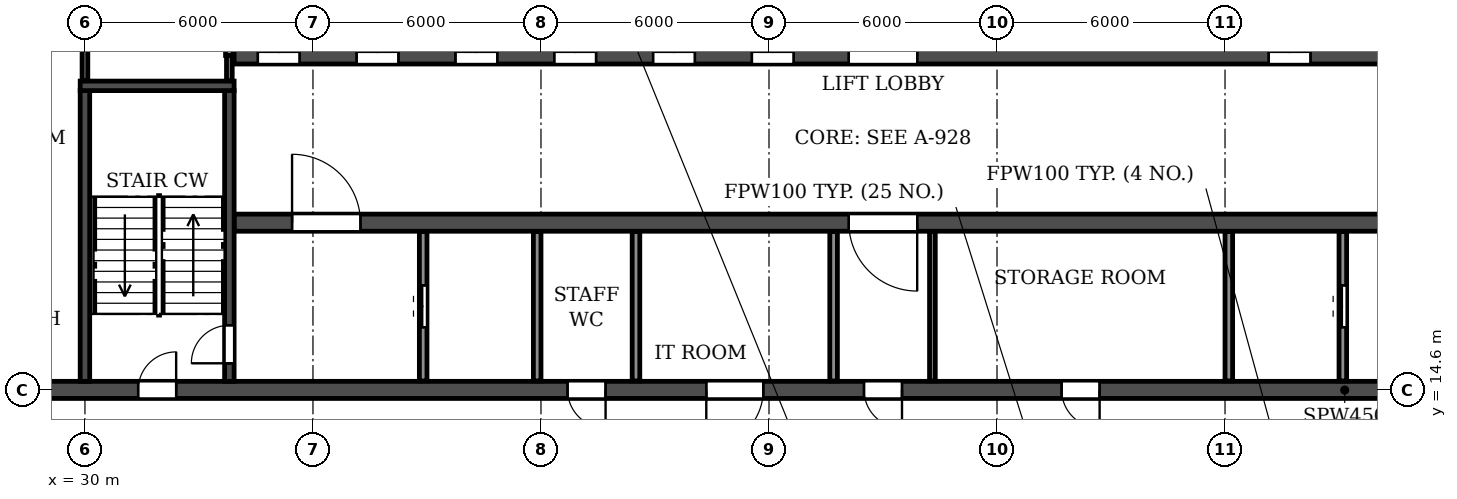
"""IFC4 building model, lengths in metres.
Left out: names, types, materials, properties, quantities, classifications, styles, units other than length and angle.
Written with IfcOpenShell. Run it as: python <this file> out.ifc"""

import sys

from ifc_helpers import new_model, si_unit, direction, frame, frame_2d, origin, place, context, subcontext, project, spatial, rectangle, extrude, element, fill, save


model = new_model("IFC4")
c1 = context("Model", 3, precision=1e-05, world=origin(), true_north=direction((0.0, 1.0)))
c2 = subcontext(c1, "Body", "Model", "MODEL_VIEW")
j1 = project(units=[si_unit("LENGTHUNIT", "METRE"), si_unit("PLANEANGLEUNIT", "RADIAN")], contexts=[c1])
p1 = place(None, origin())
s1 = spatial("IfcSite", under=j1, at=p1, CompositionType="ELEMENT")
p2 = place(p1, origin())
s2 = spatial("IfcBuilding", under=s1, at=p2, CompositionType="ELEMENT")
p3 = place(p2, frame((0.0, 0.0, 155.4)))
s3 = spatial("IfcBuildingStorey", under=s2, at=p3, CompositionType="ELEMENT", Elevation=155.4)
p4 = place(p3, frame((12.2, 14.6, 0.0), z_axis=(0.0, 0.0, 1.0), x_axis=(1.0, 0.0, 0.0)))
e1 = element("IfcWall", 1, at=p4, inside=s3, PredefinedType="SOLIDWALL", context=c2, shape_type="SweptSolid", body=[
    extrude(rectangle(XDim=77.6, YDim=0.45, at=frame_2d((38.8, 0.0))), origin(), (0.0, 0.0, 1.0), 3.0),
])
p5 = place(p4, frame((2.3, 0.0, 0.0)))
e2 = element("IfcOpeningElement", 2, at=p5, cuts=e1, PredefinedType="OPENING", context=c2, shape_type="SweptSolid", body=[
    extrude(rectangle(XDim=1.0, YDim=2.1, at=frame_2d((0.5, 1.05))), frame((0.0, 0.235, 0.0), z_axis=(0.0, -1.0, 0.0), x_axis=(1.0, 0.0, 0.0)), (0.0, 0.0, 1.0), 0.47),
])
p6 = place(p4, frame((6.7, 0.0, 0.0)))
e3 = element("IfcOpeningElement", 3, at=p6, cuts=e1, PredefinedType="OPENING", context=c2, shape_type="SweptSolid", body=[
    extrude(rectangle(XDim=1.0, YDim=2.1, at=frame_2d((0.5, 1.05))), frame((0.0, 0.235, 0.0), z_axis=(0.0, -1.0, 0.0), x_axis=(1.0, 0.0, 0.0)), (0.0, 0.0, 1.0), 0.47),
])
p7 = place(p4, frame((14.6, 0.0, 0.0)))
e4 = element("IfcOpeningElement", 4, at=p7, cuts=e1, PredefinedType="OPENING", context=c2, shape_type="SweptSolid", body=[
    extrude(rectangle(XDim=1.0, YDim=2.1, at=frame_2d((0.5, 1.05))), frame((0.0, 0.235, 0.0), z_axis=(0.0, -1.0, 0.0), x_axis=(1.0, 0.0, 0.0)), (0.0, 0.0, 1.0), 0.47),
])
p8 = place(p4, frame((19.2, 0.0, 0.0)))
e5 = element("IfcOpeningElement", 5, at=p8, cuts=e1, PredefinedType="OPENING", context=c2, shape_type="SweptSolid", body=[
    extrude(rectangle(XDim=1.0, YDim=2.1, at=frame_2d((0.5, 1.05))), frame((0.0, 0.235, 0.0), z_axis=(0.0, -1.0, 0.0), x_axis=(1.0, 0.0, 0.0)), (0.0, 0.0, 1.0), 0.47),
])
p9 = place(p4, frame((30.5, 0.0, 0.0)))
e6 = element("IfcOpeningElement", 6, at=p9, cuts=e1, PredefinedType="OPENING", context=c2, shape_type="SweptSolid", body=[
    extrude(rectangle(XDim=1.0, YDim=2.1, at=frame_2d((0.5, 1.05))), frame((0.0, 0.235, 0.0), z_axis=(0.0, -1.0, 0.0), x_axis=(1.0, 0.0, 0.0)), (0.0, 0.0, 1.0), 0.47),
])
p10 = place(p4, frame((34.15, 0.0, 0.0)))
e7 = element("IfcOpeningElement", 7, at=p10, cuts=e1, PredefinedType="OPENING", context=c2, shape_type="SweptSolid", body=[
    extrude(rectangle(XDim=1.5, YDim=2.1, at=frame_2d((0.75, 1.05))), frame((0.0, 0.235, 0.0), z_axis=(0.0, -1.0, 0.0), x_axis=(1.0, 0.0, 0.0)), (0.0, 0.0, 1.0), 0.47),
])
p11 = place(p4, frame((38.3, 0.0, 0.0)))
e8 = element("IfcOpeningElement", 8, at=p11, cuts=e1, PredefinedType="OPENING", context=c2, shape_type="SweptSolid", body=[
    extrude(rectangle(XDim=1.0, YDim=2.1, at=frame_2d((0.5, 1.05))), frame((0.0, 0.235, 0.0), z_axis=(0.0, -1.0, 0.0), x_axis=(1.0, 0.0, 0.0)), (0.0, 0.0, 1.0), 0.47),
])
p12 = place(p4, frame((43.5, 0.0, 0.0)))
e9 = element("IfcOpeningElement", 9, at=p12, cuts=e1, PredefinedType="OPENING", context=c2, shape_type="SweptSolid", body=[
    extrude(rectangle(XDim=1.0, YDim=2.1, at=frame_2d((0.5, 1.05))), frame((0.0, 0.235, 0.0), z_axis=(0.0, -1.0, 0.0), x_axis=(1.0, 0.0, 0.0)), (0.0, 0.0, 1.0), 0.47),
])
p13 = place(p4, frame((57.4, 0.0, 0.0)))
e10 = element("IfcOpeningElement", 10, at=p13, cuts=e1, PredefinedType="OPENING", context=c2, shape_type="SweptSolid", body=[
    extrude(rectangle(XDim=1.0, YDim=2.1, at=frame_2d((0.5, 1.05))), frame((0.0, 0.235, 0.0), z_axis=(0.0, -1.0, 0.0), x_axis=(1.0, 0.0, 0.0)), (0.0, 0.0, 1.0), 0.47),
])
p14 = place(p4, frame((62.0, 0.0, 0.0)))
e11 = element("IfcOpeningElement", 11, at=p14, cuts=e1, PredefinedType="OPENING", context=c2, shape_type="SweptSolid", body=[
    extrude(rectangle(XDim=1.0, YDim=2.1, at=frame_2d((0.5, 1.05))), frame((0.0, 0.235, 0.0), z_axis=(0.0, -1.0, 0.0), x_axis=(1.0, 0.0, 0.0)), (0.0, 0.0, 1.0), 0.47),
])
p15 = place(p4, frame((69.9, 0.0, 0.0)))
e12 = element("IfcOpeningElement", 12, at=p15, cuts=e1, PredefinedType="OPENING", context=c2, shape_type="SweptSolid", body=[
    extrude(rectangle(XDim=1.0, YDim=2.1, at=frame_2d((0.5, 1.05))), frame((0.0, 0.235, 0.0), z_axis=(0.0, -1.0, 0.0), x_axis=(1.0, 0.0, 0.0)), (0.0, 0.0, 1.0), 0.47),
])
p16 = place(p4, frame((74.3, 0.0, 0.0)))
e13 = element("IfcOpeningElement", 13, at=p16, cuts=e1, PredefinedType="OPENING", context=c2, shape_type="SweptSolid", body=[
    extrude(rectangle(XDim=1.0, YDim=2.1, at=frame_2d((0.5, 1.05))), frame((0.0, 0.235, 0.0), z_axis=(0.0, -1.0, 0.0), x_axis=(1.0, 0.0, 0.0)), (0.0, 0.0, 1.0), 0.47),
])
p17 = place(p3, frame((33.925, 19.0, 0.0), z_axis=(0.0, 0.0, 1.0), x_axis=(1.0, 0.0, 0.0)))
e14 = element("IfcWall", 14, at=p17, inside=s3, PredefinedType="SOLIDWALL", context=c2, shape_type="SweptSolid", body=[
    extrude(rectangle(XDim=34.15, YDim=0.45, at=frame_2d((17.075, 0.0))), origin(), (0.0, 0.0, 1.0), 3.0),
])
p18 = place(p17, frame((16.175, 0.0, 0.0)))
e15 = element("IfcOpeningElement", 15, at=p18, cuts=e14, PredefinedType="OPENING", context=c2, shape_type="SweptSolid", body=[
    extrude(rectangle(XDim=1.8, YDim=2.1, at=frame_2d((0.9, 1.05))), frame((0.0, 0.235, 0.0), z_axis=(0.0, -1.0, 0.0), x_axis=(1.0, 0.0, 0.0)), (0.0, 0.0, 1.0), 0.47),
])
p19 = place(p17, frame((1.525, 0.0, 0.0)))
e16 = element("IfcOpeningElement", 16, at=p19, cuts=e14, PredefinedType="OPENING", context=c2, shape_type="SweptSolid", body=[
    extrude(rectangle(XDim=1.8, YDim=2.1, at=frame_2d((0.9, 1.05))), frame((0.0, 0.235, 0.0), z_axis=(0.0, -1.0, 0.0), x_axis=(1.0, 0.0, 0.0)), (0.0, 0.0, 1.0), 0.47),
])
p20 = place(p17, frame((30.825, 0.0, 0.0)))
e17 = element("IfcOpeningElement", 17, at=p20, cuts=e14, PredefinedType="OPENING", context=c2, shape_type="SweptSolid", body=[
    extrude(rectangle(XDim=1.8, YDim=2.1, at=frame_2d((0.9, 1.05))), frame((0.0, 0.235, 0.0), z_axis=(0.0, -1.0, 0.0), x_axis=(1.0, 0.0, 0.0)), (0.0, 0.0, 1.0), 0.47),
])
p21 = place(p3, frame((33.925, 23.4, 0.0), z_axis=(0.0, 0.0, 1.0), x_axis=(1.0, 0.0, 0.0)))
e18 = element("IfcWall", 18, at=p21, inside=s3, PredefinedType="SOLIDWALL", context=c2, shape_type="SweptSolid", body=[
    extrude(rectangle(XDim=34.15, YDim=0.45, at=frame_2d((17.075, 0.0))), origin(), (0.0, 0.0, 1.0), 3.0),
])
p22 = place(p21, frame((16.175, 0.0, 0.0)))
e19 = element("IfcOpeningElement", 19, at=p22, cuts=e18, PredefinedType="OPENING", context=c2, shape_type="SweptSolid", body=[
    extrude(rectangle(XDim=1.8, YDim=2.1, at=frame_2d((0.9, 1.05))), frame((0.0, 0.235, 0.0), z_axis=(0.0, -1.0, 0.0), x_axis=(1.0, 0.0, 0.0)), (0.0, 0.0, 1.0), 0.47),
])
p23 = place(p21, frame((0.625, 0.0, 0.0)))
e20 = element("IfcOpeningElement", 20, at=p23, cuts=e18, PredefinedType="OPENING", context=c2, shape_type="SweptSolid", body=[
    extrude(rectangle(XDim=1.1, YDim=2.1, at=frame_2d((0.55, 1.05))), frame((0.0, 0.235, 0.0), z_axis=(0.0, -1.0, 0.0), x_axis=(1.0, 0.0, 0.0)), (0.0, 0.0, 1.0), 0.47),
])
p24 = place(p21, frame((3.225, 0.0, 0.0)))
e21 = element("IfcOpeningElement", 21, at=p24, cuts=e18, PredefinedType="OPENING", context=c2, shape_type="SweptSolid", body=[
    extrude(rectangle(XDim=1.1, YDim=2.1, at=frame_2d((0.55, 1.05))), frame((0.0, 0.235, 0.0), z_axis=(0.0, -1.0, 0.0), x_axis=(1.0, 0.0, 0.0)), (0.0, 0.0, 1.0), 0.47),
])
p25 = place(p21, frame((5.825, 0.0, 0.0)))
e22 = element("IfcOpeningElement", 22, at=p25, cuts=e18, PredefinedType="OPENING", context=c2, shape_type="SweptSolid", body=[
    extrude(rectangle(XDim=1.1, YDim=2.1, at=frame_2d((0.55, 1.05))), frame((0.0, 0.235, 0.0), z_axis=(0.0, -1.0, 0.0), x_axis=(1.0, 0.0, 0.0)), (0.0, 0.0, 1.0), 0.47),
])
p26 = place(p21, frame((8.425, 0.0, 0.0)))
e23 = element("IfcOpeningElement", 23, at=p26, cuts=e18, PredefinedType="OPENING", context=c2, shape_type="SweptSolid", body=[
    extrude(rectangle(XDim=1.1, YDim=2.1, at=frame_2d((0.55, 1.05))), frame((0.0, 0.235, 0.0), z_axis=(0.0, -1.0, 0.0), x_axis=(1.0, 0.0, 0.0)), (0.0, 0.0, 1.0), 0.47),
])
p27 = place(p21, frame((11.025, 0.0, 0.0)))
e24 = element("IfcOpeningElement", 24, at=p27, cuts=e18, PredefinedType="OPENING", context=c2, shape_type="SweptSolid", body=[
    extrude(rectangle(XDim=1.1, YDim=2.1, at=frame_2d((0.55, 1.05))), frame((0.0, 0.235, 0.0), z_axis=(0.0, -1.0, 0.0), x_axis=(1.0, 0.0, 0.0)), (0.0, 0.0, 1.0), 0.47),
])
p28 = place(p21, frame((13.625, 0.0, 0.0)))
e25 = element("IfcOpeningElement", 25, at=p28, cuts=e18, PredefinedType="OPENING", context=c2, shape_type="SweptSolid", body=[
    extrude(rectangle(XDim=1.1, YDim=2.1, at=frame_2d((0.55, 1.05))), frame((0.0, 0.235, 0.0), z_axis=(0.0, -1.0, 0.0), x_axis=(1.0, 0.0, 0.0)), (0.0, 0.0, 1.0), 0.47),
])
p29 = place(p21, frame((27.225, 0.0, 0.0)))
e26 = element("IfcOpeningElement", 26, at=p29, cuts=e18, PredefinedType="OPENING", context=c2, shape_type="SweptSolid", body=[
    extrude(rectangle(XDim=1.1, YDim=2.1, at=frame_2d((0.55, 1.05))), frame((0.0, 0.235, 0.0), z_axis=(0.0, -1.0, 0.0), x_axis=(1.0, 0.0, 0.0)), (0.0, 0.0, 1.0), 0.47),
])
p30 = place(p3, frame((30.0, 14.825, 0.0), z_axis=(0.0, 0.0, 1.0), x_axis=(0.0, 1.0, 0.0)))
e27 = element("IfcWall", 27, at=p30, inside=s3, PredefinedType="SOLIDWALL", context=c2, shape_type="SweptSolid", body=[
    extrude(rectangle(XDim=7.65, YDim=0.25, at=frame_2d((3.825, 0.0))), origin(), (0.0, 0.0, 1.0), 3.0),
])
p31 = place(p3, frame((33.8, 14.825, 0.0), z_axis=(0.0, 0.0, 1.0), x_axis=(0.0, 1.0, 0.0)))
e28 = element("IfcWall", 28, at=p31, inside=s3, PredefinedType="SOLIDWALL", context=c2, shape_type="SweptSolid", body=[
    extrude(rectangle(XDim=7.65, YDim=0.25, at=frame_2d((3.825, 0.0))), origin(), (0.0, 0.0, 1.0), 3.0),
])
p32 = place(p31, frame((0.475, 0.0, 0.0)))
e29 = element("IfcOpeningElement", 29, at=p32, cuts=e28, PredefinedType="OPENING", context=c2, shape_type="SweptSolid", body=[
    extrude(rectangle(XDim=1.0, YDim=2.1, at=frame_2d((0.5, 1.05))), frame((0.0, 0.135, 0.0), z_axis=(0.0, -1.0, 0.0), x_axis=(1.0, 0.0, 0.0)), (0.0, 0.0, 1.0), 0.27),
])
p33 = place(p3, frame((29.875, 22.6, 0.0), z_axis=(0.0, 0.0, 1.0), x_axis=(1.0, 0.0, 0.0)))
e30 = element("IfcWall", 30, at=p33, inside=s3, PredefinedType="SOLIDWALL", context=c2, shape_type="SweptSolid", body=[
    extrude(rectangle(XDim=4.05, YDim=0.25, at=frame_2d((2.025, 0.0))), origin(), (0.0, 0.0, 1.0), 3.0),
])
p34 = place(p3, frame((52.3, 14.835, 0.0), z_axis=(0.0, 0.0, 1.0), x_axis=(0.0, 1.0, 0.0)))
e31 = element("IfcWall", 31, at=p34, inside=s3, PredefinedType="PARTITIONING", context=c2, shape_type="SweptSolid", body=[
    extrude(rectangle(XDim=3.93, YDim=0.15, at=frame_2d((1.965, 0.0))), origin(), (0.0, 0.0, 1.0), 3.0),
])
for number, where, z_axis, x_axis in (
    (32, (44.5, 14.835, 0.0), (0.0, 0.0, 1.0), (0.0, 1.0, 0.0)),
    (33, (49.7, 14.835, 0.0), (0.0, 0.0, 1.0), (0.0, 1.0, 0.0)),
):
    element("IfcWall", number, at=place(p3, frame(where, z_axis=z_axis, x_axis=x_axis)), inside=s3, PredefinedType="PARTITIONING", context=c2, shape_type="SweptSolid", body=[
        extrude(rectangle(XDim=3.93, YDim=0.2, at=frame_2d((1.965, 0.0))), origin(), (0.0, 0.0, 1.0), 3.0),
    ])
p35 = place(p3, frame((30.0, 22.735, 0.0), z_axis=(0.0, 0.0, 1.0), x_axis=(0.0, 1.0, 0.0)))
e34 = element("IfcWall", 34, at=p35, inside=s3, PredefinedType="PARTITIONING", context=c2, shape_type="SweptSolid", body=[
    extrude(rectangle(XDim=4.83, YDim=0.15, at=frame_2d((2.415, 0.0))), origin(), (0.0, 0.0, 1.0), 3.0),
])
p36 = place(p3, frame((33.8, 22.735, 0.0), z_axis=(0.0, 0.0, 1.0), x_axis=(0.0, 1.0, 0.0)))
e35 = element("IfcWall", 35, at=p36, inside=s3, PredefinedType="PARTITIONING", context=c2, shape_type="SweptSolid", body=[
    extrude(rectangle(XDim=0.665, YDim=0.15, at=frame_2d((0.333, 0.0))), origin(), (0.0, 0.0, 1.0), 3.0),
])
p37 = place(p3, frame((33.8, 23.4, 0.0), z_axis=(0.0, 0.0, 1.0), x_axis=(0.0, 1.0, 0.0)))
e36 = element("IfcWall", 36, at=p37, inside=s3, PredefinedType="PARTITIONING", context=c2, shape_type="SweptSolid", body=[
    extrude(rectangle(XDim=2.7, YDim=0.2, at=frame_2d((1.35, 0.0))), origin(), (0.0, 0.0, 1.0), 3.0),
])
p38 = place(p3, frame((38.9, 14.835, 0.0), z_axis=(0.0, 0.0, 1.0), x_axis=(0.0, 1.0, 0.0)))
e37 = element("IfcWall", 37, at=p38, inside=s3, PredefinedType="PARTITIONING", context=c2, shape_type="SweptSolid", body=[
    extrude(rectangle(XDim=3.93, YDim=0.2, at=frame_2d((1.965, 0.0))), origin(), (0.0, 0.0, 1.0), 3.0),
])
p39 = place(p38, frame((1.415, 0.0, 0.0)))
e38 = element("IfcOpeningElement", 38, at=p39, cuts=e37, PredefinedType="OPENING", context=c2, shape_type="SweptSolid", body=[
    extrude(rectangle(XDim=1.1, YDim=2.1, at=frame_2d((0.55, 1.05))), frame((0.0, 0.11, 0.0), z_axis=(0.0, -1.0, 0.0), x_axis=(1.0, 0.0, 0.0)), (0.0, 0.0, 1.0), 0.22),
])
for number, where, z_axis, x_axis in (
    (39, (41.9, 14.835, 0.0), (0.0, 0.0, 1.0), (0.0, 1.0, 0.0)),
    (40, (60.1, 14.835, 0.0), (0.0, 0.0, 1.0), (0.0, 1.0, 0.0)),
):
    element("IfcWall", number, at=place(p3, frame(where, z_axis=z_axis, x_axis=x_axis)), inside=s3, PredefinedType="PARTITIONING", context=c2, shape_type="SweptSolid", body=[
        extrude(rectangle(XDim=3.93, YDim=0.2, at=frame_2d((1.965, 0.0))), origin(), (0.0, 0.0, 1.0), 3.0),
    ])
p40 = place(p3, frame((63.1, 14.835, 0.0), z_axis=(0.0, 0.0, 1.0), x_axis=(0.0, 1.0, 0.0)))
e41 = element("IfcWall", 41, at=p40, inside=s3, PredefinedType="PARTITIONING", context=c2, shape_type="SweptSolid", body=[
    extrude(rectangle(XDim=3.93, YDim=0.2, at=frame_2d((1.965, 0.0))), origin(), (0.0, 0.0, 1.0), 3.0),
])
p41 = place(p40, frame((1.415, 0.0, 0.0)))
e42 = element("IfcOpeningElement", 42, at=p41, cuts=e41, PredefinedType="OPENING", context=c2, shape_type="SweptSolid", body=[
    extrude(rectangle(XDim=1.1, YDim=2.1, at=frame_2d((0.55, 1.05))), frame((0.0, 0.11, 0.0), z_axis=(0.0, -1.0, 0.0), x_axis=(1.0, 0.0, 0.0)), (0.0, 0.0, 1.0), 0.22),
])
p42 = place(p8, origin())
e43 = element("IfcDoor", 43, at=p42, inside=s3, OperationType="SINGLE_SWING_RIGHT", PredefinedType="DOOR", context=c2, shape_type="SweptSolid", body=[
    extrude(rectangle(XDim=1.0, YDim=2.1, at=frame_2d((0.5, 1.05))), frame((0.0, 0.025, 0.0), z_axis=(0.0, -1.0, 0.0), x_axis=(1.0, 0.0, 0.0)), (0.0, 0.0, 1.0), 0.05),
])
fill(e5, e43)
p43 = place(p9, frame((1.0, 0.0, 0.0), z_axis=(0.0, 0.0, 1.0), x_axis=(-1.0, 0.0, 0.0)))
e44 = element("IfcDoor", 44, at=p43, inside=s3, OperationType="SINGLE_SWING_LEFT", PredefinedType="DOOR", context=c2, shape_type="SweptSolid", body=[
    extrude(rectangle(XDim=1.0, YDim=2.1, at=frame_2d((0.5, 1.05))), frame((0.0, 0.025, 0.0), z_axis=(0.0, -1.0, 0.0), x_axis=(1.0, 0.0, 0.0)), (0.0, 0.0, 1.0), 0.05),
])
fill(e6, e44)
p44 = place(p10, frame((1.5, 0.0, 0.0), z_axis=(0.0, 0.0, 1.0), x_axis=(-1.0, 0.0, 0.0)))
e45 = element("IfcDoor", 45, at=p44, inside=s3, OperationType="DOUBLE_DOOR_SINGLE_SWING", PredefinedType="DOOR", context=c2, shape_type="SweptSolid", body=[
    extrude(rectangle(XDim=1.5, YDim=2.1, at=frame_2d((0.75, 1.05))), frame((0.0, 0.025, 0.0), z_axis=(0.0, -1.0, 0.0), x_axis=(1.0, 0.0, 0.0)), (0.0, 0.0, 1.0), 0.05),
])
fill(e7, e45)
p45 = place(p11, frame((1.0, 0.0, 0.0), z_axis=(0.0, 0.0, 1.0), x_axis=(-1.0, 0.0, 0.0)))
e46 = element("IfcDoor", 46, at=p45, inside=s3, OperationType="SINGLE_SWING_LEFT", PredefinedType="DOOR", context=c2, shape_type="SweptSolid", body=[
    extrude(rectangle(XDim=1.0, YDim=2.1, at=frame_2d((0.5, 1.05))), frame((0.0, 0.025, 0.0), z_axis=(0.0, -1.0, 0.0), x_axis=(1.0, 0.0, 0.0)), (0.0, 0.0, 1.0), 0.05),
])
fill(e8, e46)
p46 = place(p12, frame((1.0, 0.0, 0.0), z_axis=(0.0, 0.0, 1.0), x_axis=(-1.0, 0.0, 0.0)))
e47 = element("IfcDoor", 47, at=p46, inside=s3, OperationType="SINGLE_SWING_LEFT", PredefinedType="DOOR", context=c2, shape_type="SweptSolid", body=[
    extrude(rectangle(XDim=1.0, YDim=2.1, at=frame_2d((0.5, 1.05))), frame((0.0, 0.025, 0.0), z_axis=(0.0, -1.0, 0.0), x_axis=(1.0, 0.0, 0.0)), (0.0, 0.0, 1.0), 0.05),
])
fill(e9, e47)
p47 = place(p41, origin())
e48 = element("IfcDoor", 48, at=p47, inside=s3, OperationType="DOUBLE_DOOR_SLIDING", PredefinedType="DOOR", context=c2, shape_type="SweptSolid", body=[
    extrude(rectangle(XDim=1.1, YDim=2.1, at=frame_2d((0.55, 1.05))), frame((0.0, 0.025, 0.0), z_axis=(0.0, -1.0, 0.0), x_axis=(1.0, 0.0, 0.0)), (0.0, 0.0, 1.0), 0.05),
])
fill(e42, e48)
p48 = place(p32, origin())
e49 = element("IfcDoor", 49, at=p48, inside=s3, OperationType="SINGLE_SWING_LEFT", PredefinedType="DOOR", context=c2, shape_type="SweptSolid", body=[
    extrude(rectangle(XDim=1.0, YDim=2.1, at=frame_2d((0.5, 1.05))), frame((0.0, 0.025, 0.0), z_axis=(0.0, -1.0, 0.0), x_axis=(1.0, 0.0, 0.0)), (0.0, 0.0, 1.0), 0.05),
])
fill(e29, e49)
p49 = place(p39, origin())
e50 = element("IfcDoor", 50, at=p49, inside=s3, OperationType="DOUBLE_DOOR_SLIDING", PredefinedType="DOOR", context=c2, shape_type="SweptSolid", body=[
    extrude(rectangle(XDim=1.1, YDim=2.1, at=frame_2d((0.55, 1.05))), frame((0.0, 0.025, 0.0), z_axis=(0.0, -1.0, 0.0), x_axis=(1.0, 0.0, 0.0)), (0.0, 0.0, 1.0), 0.05),
])
fill(e38, e50)
p50 = place(p22, origin())
e51 = element("IfcDoor", 51, at=p50, inside=s3, OperationType="DOUBLE_DOOR_SINGLE_SWING", PredefinedType="DOOR", context=c2, shape_type="SweptSolid", body=[
    extrude(rectangle(XDim=1.8, YDim=2.1, at=frame_2d((0.9, 1.05))), frame((0.0, 0.025, 0.0), z_axis=(0.0, -1.0, 0.0), x_axis=(1.0, 0.0, 0.0)), (0.0, 0.0, 1.0), 0.05),
])
fill(e19, e51)
p51 = place(p18, frame((1.8, 0.0, 0.0), z_axis=(0.0, 0.0, 1.0), x_axis=(-1.0, 0.0, 0.0)))
e52 = element("IfcDoor", 52, at=p51, inside=s3, OperationType="DOUBLE_DOOR_SINGLE_SWING", PredefinedType="DOOR", context=c2, shape_type="SweptSolid", body=[
    extrude(rectangle(XDim=1.8, YDim=2.1, at=frame_2d((0.9, 1.05))), frame((0.0, 0.025, 0.0), z_axis=(0.0, -1.0, 0.0), x_axis=(1.0, 0.0, 0.0)), (0.0, 0.0, 1.0), 0.05),
])
fill(e15, e52)
p52 = place(p23, origin())
e53 = element("IfcDoor", 53, at=p52, inside=s3, OperationType="DOUBLE_DOOR_SLIDING", PredefinedType="DOOR", context=c2, shape_type="SweptSolid", body=[
    extrude(rectangle(XDim=1.1, YDim=2.1, at=frame_2d((0.55, 1.05))), frame((0.0, 0.025, 0.0), z_axis=(0.0, -1.0, 0.0), x_axis=(1.0, 0.0, 0.0)), (0.0, 0.0, 1.0), 0.05),
])
fill(e20, e53)
p53 = place(p19, origin())
e54 = element("IfcDoor", 54, at=p53, inside=s3, OperationType="DOUBLE_DOOR_SINGLE_SWING", PredefinedType="DOOR", context=c2, shape_type="SweptSolid", body=[
    extrude(rectangle(XDim=1.8, YDim=2.1, at=frame_2d((0.9, 1.05))), frame((0.0, 0.025, 0.0), z_axis=(0.0, -1.0, 0.0), x_axis=(1.0, 0.0, 0.0)), (0.0, 0.0, 1.0), 0.05),
])
fill(e16, e54)
p54 = place(p24, origin())
e55 = element("IfcDoor", 55, at=p54, inside=s3, OperationType="DOUBLE_DOOR_SLIDING", PredefinedType="DOOR", context=c2, shape_type="SweptSolid", body=[
    extrude(rectangle(XDim=1.1, YDim=2.1, at=frame_2d((0.55, 1.05))), frame((0.0, 0.025, 0.0), z_axis=(0.0, -1.0, 0.0), x_axis=(1.0, 0.0, 0.0)), (0.0, 0.0, 1.0), 0.05),
])
fill(e21, e55)
p55 = place(p25, origin())
e56 = element("IfcDoor", 56, at=p55, inside=s3, OperationType="DOUBLE_DOOR_SLIDING", PredefinedType="DOOR", context=c2, shape_type="SweptSolid", body=[
    extrude(rectangle(XDim=1.1, YDim=2.1, at=frame_2d((0.55, 1.05))), frame((0.0, 0.025, 0.0), z_axis=(0.0, -1.0, 0.0), x_axis=(1.0, 0.0, 0.0)), (0.0, 0.0, 1.0), 0.05),
])
fill(e22, e56)
p56 = place(p26, origin())
e57 = element("IfcDoor", 57, at=p56, inside=s3, OperationType="DOUBLE_DOOR_SLIDING", PredefinedType="DOOR", context=c2, shape_type="SweptSolid", body=[
    extrude(rectangle(XDim=1.1, YDim=2.1, at=frame_2d((0.55, 1.05))), frame((0.0, 0.025, 0.0), z_axis=(0.0, -1.0, 0.0), x_axis=(1.0, 0.0, 0.0)), (0.0, 0.0, 1.0), 0.05),
])
fill(e23, e57)
p57 = place(p27, origin())
e58 = element("IfcDoor", 58, at=p57, inside=s3, OperationType="DOUBLE_DOOR_SLIDING", PredefinedType="DOOR", context=c2, shape_type="SweptSolid", body=[
    extrude(rectangle(XDim=1.1, YDim=2.1, at=frame_2d((0.55, 1.05))), frame((0.0, 0.025, 0.0), z_axis=(0.0, -1.0, 0.0), x_axis=(1.0, 0.0, 0.0)), (0.0, 0.0, 1.0), 0.05),
])
fill(e24, e58)
p58 = place(p28, origin())
e59 = element("IfcDoor", 59, at=p58, inside=s3, OperationType="DOUBLE_DOOR_SLIDING", PredefinedType="DOOR", context=c2, shape_type="SweptSolid", body=[
    extrude(rectangle(XDim=1.1, YDim=2.1, at=frame_2d((0.55, 1.05))), frame((0.0, 0.025, 0.0), z_axis=(0.0, -1.0, 0.0), x_axis=(1.0, 0.0, 0.0)), (0.0, 0.0, 1.0), 0.05),
])
fill(e25, e59)
p59 = place(p29, origin())
e60 = element("IfcDoor", 60, at=p59, inside=s3, OperationType="DOUBLE_DOOR_SLIDING", PredefinedType="DOOR", context=c2, shape_type="SweptSolid", body=[
    extrude(rectangle(XDim=1.1, YDim=2.1, at=frame_2d((0.55, 1.05))), frame((0.0, 0.025, 0.0), z_axis=(0.0, -1.0, 0.0), x_axis=(1.0, 0.0, 0.0)), (0.0, 0.0, 1.0), 0.05),
])
fill(e26, e60)
save(model, sys.argv[1])
